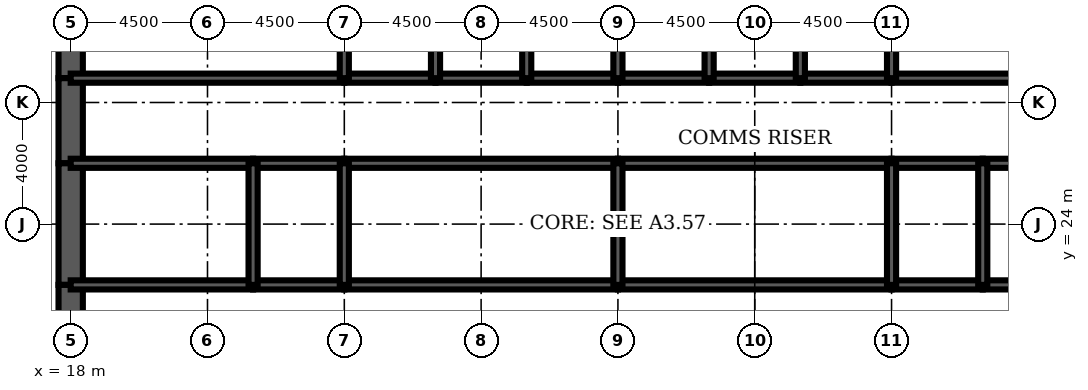
"""IFC4 building model, lengths in metres.
Left out: names, types, materials, properties, quantities, classifications, styles, units other than length and angle.
Written with IfcOpenShell. Run it as: python <this file> out.ifc"""

import sys

from ifc_helpers import new_model, si_unit, direction, frame, frame_2d, origin, place, context, subcontext, project, spatial, rectangle, extrude, element, fill, save


model = new_model("IFC4")
c1 = context("Model", 3, precision=1e-05, world=origin(), true_north=direction((0.0, 1.0)))
c2 = subcontext(c1, "Body", "Model", "MODEL_VIEW")
j1 = project(units=[si_unit("LENGTHUNIT", "METRE"), si_unit("PLANEANGLEUNIT", "RADIAN")], contexts=[c1])
p1 = place(None, origin())
s1 = spatial("IfcSite", under=j1, at=p1, CompositionType="ELEMENT")
p2 = place(p1, origin())
s2 = spatial("IfcBuilding", under=s1, at=p2, CompositionType="ELEMENT")
p3 = place(p2, frame((0.0, 0.0, 244.6)))
s3 = spatial("IfcBuildingStorey", under=s2, at=p3, CompositionType="ELEMENT", Elevation=244.6)
p4 = place(p3, frame((18.0, 32.0, 0.0), z_axis=(0.0, 0.0, 1.0), x_axis=(0.0, -1.0, 0.0)))
e1 = element("IfcWall", 1, at=p4, inside=s3, PredefinedType="SHEAR", context=c2, shape_type="SweptSolid", body=[
    extrude(rectangle(XDim=3.2, YDim=0.8, at=frame_2d((1.6, 0.0))), origin(), (0.0, 0.0, 1.0), 4.2),
])
p5 = place(p3, frame((18.0, 28.8, 0.0), z_axis=(0.0, 0.0, 1.0), x_axis=(0.0, -1.0, 0.0)))
e2 = element("IfcWall", 2, at=p5, inside=s3, PredefinedType="SHEAR", context=c2, shape_type="SweptSolid", body=[
    extrude(rectangle(XDim=2.8, YDim=0.8, at=frame_2d((1.4, 0.0))), origin(), (0.0, 0.0, 1.0), 4.2),
])
p6 = place(p5, frame((0.4, 0.0, 0.0)))
e3 = element("IfcOpeningElement", 3, at=p6, cuts=e2, PredefinedType="OPENING", context=c2, shape_type="SweptSolid", body=[
    extrude(rectangle(XDim=1.8, YDim=2.1, at=frame_2d((0.9, 1.05))), frame((0.0, 0.41, 0.0), z_axis=(0.0, -1.0, 0.0), x_axis=(1.0, 0.0, 0.0)), (0.0, 0.0, 1.0), 0.82),
])
p7 = place(p3, frame((18.0, 26.0, 0.0), z_axis=(0.0, 0.0, 1.0), x_axis=(0.0, -1.0, 0.0)))
e4 = element("IfcWall", 4, at=p7, inside=s3, PredefinedType="SHEAR", context=c2, shape_type="SweptSolid", body=[
    extrude(rectangle(XDim=4.0, YDim=0.8, at=frame_2d((2.0, 0.0))), origin(), (0.0, 0.0, 1.0), 4.2),
])
p8 = place(p3, frame((18.0, 22.0, 0.0), z_axis=(0.0, 0.0, 1.0), x_axis=(0.0, -1.0, 0.0)))
e5 = element("IfcWall", 5, at=p8, inside=s3, PredefinedType="SHEAR", context=c2, shape_type="SweptSolid", body=[
    extrude(rectangle(XDim=2.8, YDim=0.8, at=frame_2d((1.4, 0.0))), origin(), (0.0, 0.0, 1.0), 4.2),
])
p9 = place(p8, frame((0.6, 0.0, 0.0)))
e6 = element("IfcOpeningElement", 6, at=p9, cuts=e5, PredefinedType="OPENING", context=c2, shape_type="SweptSolid", body=[
    extrude(rectangle(XDim=1.8, YDim=2.1, at=frame_2d((0.9, 1.05))), frame((0.0, 0.41, 0.0), z_axis=(0.0, -1.0, 0.0), x_axis=(1.0, 0.0, 0.0)), (0.0, 0.0, 1.0), 0.82),
])
p10 = place(p3, frame((18.0, 28.8, 0.0), z_axis=(0.0, 0.0, 1.0), x_axis=(1.0, 0.0, 0.0)))
e7 = element("IfcWall", 7, at=p10, inside=s3, PredefinedType="SOLIDWALL", context=c2, shape_type="SweptSolid", body=[
    extrude(rectangle(XDim=9.0, YDim=0.3, at=frame_2d((4.5, 0.0))), origin(), (0.0, 0.0, 1.0), 4.2),
])
p11 = place(p10, frame((0.65, 0.0, 0.0)))
e8 = element("IfcOpeningElement", 8, at=p11, cuts=e7, PredefinedType="OPENING", context=c2, shape_type="SweptSolid", body=[
    extrude(rectangle(XDim=1.0, YDim=2.1, at=frame_2d((0.5, 1.05))), frame((0.0, 0.16, 0.0), z_axis=(0.0, -1.0, 0.0), x_axis=(1.0, 0.0, 0.0)), (0.0, 0.0, 1.0), 0.32),
])
p12 = place(p3, frame((27.0, 28.8, 0.0), z_axis=(0.0, 0.0, 1.0), x_axis=(1.0, 0.0, 0.0)))
e9 = element("IfcWall", 9, at=p12, inside=s3, PredefinedType="SOLIDWALL", context=c2, shape_type="SweptSolid", body=[
    extrude(rectangle(XDim=3.0, YDim=0.3, at=frame_2d((1.5, 0.0))), origin(), (0.0, 0.0, 1.0), 4.2),
])
p13 = place(p12, frame((0.95, 0.0, 0.0)))
e10 = element("IfcOpeningElement", 10, at=p13, cuts=e9, PredefinedType="OPENING", context=c2, shape_type="SweptSolid", body=[
    extrude(rectangle(XDim=1.1, YDim=2.2, at=frame_2d((0.55, 1.1))), frame((0.0, 0.16, 0.0), z_axis=(0.0, -1.0, 0.0), x_axis=(1.0, 0.0, 0.0)), (0.0, 0.0, 1.0), 0.32),
])
p14 = place(p3, frame((30.0, 28.8, 0.0), z_axis=(0.0, 0.0, 1.0), x_axis=(1.0, 0.0, 0.0)))
e11 = element("IfcWall", 11, at=p14, inside=s3, PredefinedType="SOLIDWALL", context=c2, shape_type="SweptSolid", body=[
    extrude(rectangle(XDim=3.0, YDim=0.3, at=frame_2d((1.5, 0.0))), origin(), (0.0, 0.0, 1.0), 4.2),
])
p15 = place(p14, frame((0.95, 0.0, 0.0)))
e12 = element("IfcOpeningElement", 12, at=p15, cuts=e11, PredefinedType="OPENING", context=c2, shape_type="SweptSolid", body=[
    extrude(rectangle(XDim=1.1, YDim=2.2, at=frame_2d((0.55, 1.1))), frame((0.0, 0.16, 0.0), z_axis=(0.0, -1.0, 0.0), x_axis=(1.0, 0.0, 0.0)), (0.0, 0.0, 1.0), 0.32),
])
p16 = place(p3, frame((33.0, 28.8, 0.0), z_axis=(0.0, 0.0, 1.0), x_axis=(1.0, 0.0, 0.0)))
e13 = element("IfcWall", 13, at=p16, inside=s3, PredefinedType="SOLIDWALL", context=c2, shape_type="SweptSolid", body=[
    extrude(rectangle(XDim=3.0, YDim=0.3, at=frame_2d((1.5, 0.0))), origin(), (0.0, 0.0, 1.0), 4.2),
])
p17 = place(p16, frame((0.95, 0.0, 0.0)))
e14 = element("IfcOpeningElement", 14, at=p17, cuts=e13, PredefinedType="OPENING", context=c2, shape_type="SweptSolid", body=[
    extrude(rectangle(XDim=1.1, YDim=2.2, at=frame_2d((0.55, 1.1))), frame((0.0, 0.16, 0.0), z_axis=(0.0, -1.0, 0.0), x_axis=(1.0, 0.0, 0.0)), (0.0, 0.0, 1.0), 0.32),
])
for number, where, z_axis, x_axis in (
    (15, (36.0, 28.8, 0.0), (0.0, 0.0, 1.0), (1.0, 0.0, 0.0)),
    (16, (39.0, 28.8, 0.0), (0.0, 0.0, 1.0), (1.0, 0.0, 0.0)),
):
    element("IfcWall", number, at=place(p3, frame(where, z_axis=z_axis, x_axis=x_axis)), inside=s3, PredefinedType="SOLIDWALL", context=c2, shape_type="SweptSolid", body=[
        extrude(rectangle(XDim=3.0, YDim=0.3, at=frame_2d((1.5, 0.0))), origin(), (0.0, 0.0, 1.0), 4.2),
    ])
p18 = place(p3, frame((42.0, 28.8, 0.0), z_axis=(0.0, 0.0, 1.0), x_axis=(1.0, 0.0, 0.0)))
e17 = element("IfcWall", 17, at=p18, inside=s3, PredefinedType="SOLIDWALL", context=c2, shape_type="SweptSolid", body=[
    extrude(rectangle(XDim=3.0, YDim=0.3, at=frame_2d((1.5, 0.0))), origin(), (0.0, 0.0, 1.0), 4.2),
])
p19 = place(p18, frame((0.95, 0.0, 0.0)))
e18 = element("IfcOpeningElement", 18, at=p19, cuts=e17, PredefinedType="OPENING", context=c2, shape_type="SweptSolid", body=[
    extrude(rectangle(XDim=1.1, YDim=2.2, at=frame_2d((0.55, 1.1))), frame((0.0, 0.16, 0.0), z_axis=(0.0, -1.0, 0.0), x_axis=(1.0, 0.0, 0.0)), (0.0, 0.0, 1.0), 0.32),
])
p20 = place(p3, frame((45.0, 28.8, 0.0), z_axis=(0.0, 0.0, 1.0), x_axis=(1.0, 0.0, 0.0)))
e19 = element("IfcWall", 19, at=p20, inside=s3, PredefinedType="SOLIDWALL", context=c2, shape_type="SweptSolid", body=[
    extrude(rectangle(XDim=9.0, YDim=0.3, at=frame_2d((4.5, 0.0))), origin(), (0.0, 0.0, 1.0), 4.2),
])
p21 = place(p20, frame((7.35, 0.0, 0.0)))
e20 = element("IfcOpeningElement", 20, at=p21, cuts=e19, PredefinedType="OPENING", context=c2, shape_type="SweptSolid", body=[
    extrude(rectangle(XDim=1.0, YDim=2.1, at=frame_2d((0.5, 1.05))), frame((0.0, 0.16, 0.0), z_axis=(0.0, -1.0, 0.0), x_axis=(1.0, 0.0, 0.0)), (0.0, 0.0, 1.0), 0.32),
])
p22 = place(p3, frame((18.0, 22.0, 0.0), z_axis=(0.0, 0.0, 1.0), x_axis=(1.0, 0.0, 0.0)))
e21 = element("IfcWall", 21, at=p22, inside=s3, PredefinedType="SOLIDWALL", context=c2, shape_type="SweptSolid", body=[
    extrude(rectangle(XDim=6.0, YDim=0.3, at=frame_2d((3.0, 0.0))), origin(), (0.0, 0.0, 1.0), 4.2),
])
p23 = place(p22, frame((4.4, 0.0, 0.0)))
e22 = element("IfcOpeningElement", 22, at=p23, cuts=e21, PredefinedType="OPENING", context=c2, shape_type="SweptSolid", body=[
    extrude(rectangle(XDim=1.0, YDim=2.1, at=frame_2d((0.5, 1.05))), frame((0.0, 0.16, 0.0), z_axis=(0.0, -1.0, 0.0), x_axis=(1.0, 0.0, 0.0)), (0.0, 0.0, 1.0), 0.32),
])
p24 = place(p22, frame((0.8, 0.0, 0.0)))
e23 = element("IfcOpeningElement", 23, at=p24, cuts=e21, PredefinedType="OPENING", context=c2, shape_type="SweptSolid", body=[
    extrude(rectangle(XDim=1.0, YDim=2.1, at=frame_2d((0.5, 1.05))), frame((0.0, 0.16, 0.0), z_axis=(0.0, -1.0, 0.0), x_axis=(1.0, 0.0, 0.0)), (0.0, 0.0, 1.0), 0.32),
])
p25 = place(p3, frame((24.0, 22.0, 0.0), z_axis=(0.0, 0.0, 1.0), x_axis=(1.0, 0.0, 0.0)))
e24 = element("IfcWall", 24, at=p25, inside=s3, PredefinedType="SOLIDWALL", context=c2, shape_type="SweptSolid", body=[
    extrude(rectangle(XDim=3.0, YDim=0.3, at=frame_2d((1.5, 0.0))), origin(), (0.0, 0.0, 1.0), 4.2),
])
p26 = place(p25, frame((1.0, 0.0, 0.0)))
e25 = element("IfcOpeningElement", 25, at=p26, cuts=e24, PredefinedType="OPENING", context=c2, shape_type="SweptSolid", body=[
    extrude(rectangle(XDim=1.0, YDim=2.1, at=frame_2d((0.5, 1.05))), frame((0.0, 0.16, 0.0), z_axis=(0.0, -1.0, 0.0), x_axis=(1.0, 0.0, 0.0)), (0.0, 0.0, 1.0), 0.32),
])
p27 = place(p3, frame((27.0, 22.0, 0.0), z_axis=(0.0, 0.0, 1.0), x_axis=(1.0, 0.0, 0.0)))
e26 = element("IfcWall", 26, at=p27, inside=s3, PredefinedType="SOLIDWALL", context=c2, shape_type="SweptSolid", body=[
    extrude(rectangle(XDim=9.0, YDim=0.3, at=frame_2d((4.5, 0.0))), origin(), (0.0, 0.0, 1.0), 4.2),
])
p28 = place(p27, frame((4.0, 0.0, 0.0)))
e27 = element("IfcOpeningElement", 27, at=p28, cuts=e26, PredefinedType="OPENING", context=c2, shape_type="SweptSolid", body=[
    extrude(rectangle(XDim=1.0, YDim=2.1, at=frame_2d((0.5, 1.05))), frame((0.0, 0.16, 0.0), z_axis=(0.0, -1.0, 0.0), x_axis=(1.0, 0.0, 0.0)), (0.0, 0.0, 1.0), 0.32),
])
p29 = place(p3, frame((36.0, 22.0, 0.0), z_axis=(0.0, 0.0, 1.0), x_axis=(1.0, 0.0, 0.0)))
e28 = element("IfcWall", 28, at=p29, inside=s3, PredefinedType="SOLIDWALL", context=c2, shape_type="SweptSolid", body=[
    extrude(rectangle(XDim=9.0, YDim=0.3, at=frame_2d((4.5, 0.0))), origin(), (0.0, 0.0, 1.0), 4.2),
])
p30 = place(p29, frame((4.0, 0.0, 0.0)))
e29 = element("IfcOpeningElement", 29, at=p30, cuts=e28, PredefinedType="OPENING", context=c2, shape_type="SweptSolid", body=[
    extrude(rectangle(XDim=1.0, YDim=2.1, at=frame_2d((0.5, 1.05))), frame((0.0, 0.16, 0.0), z_axis=(0.0, -1.0, 0.0), x_axis=(1.0, 0.0, 0.0)), (0.0, 0.0, 1.0), 0.32),
])
p31 = place(p3, frame((45.0, 22.0, 0.0), z_axis=(0.0, 0.0, 1.0), x_axis=(1.0, 0.0, 0.0)))
e30 = element("IfcWall", 30, at=p31, inside=s3, PredefinedType="SOLIDWALL", context=c2, shape_type="SweptSolid", body=[
    extrude(rectangle(XDim=3.0, YDim=0.3, at=frame_2d((1.5, 0.0))), origin(), (0.0, 0.0, 1.0), 4.2),
])
p32 = place(p31, frame((1.0, 0.0, 0.0)))
e31 = element("IfcOpeningElement", 31, at=p32, cuts=e30, PredefinedType="OPENING", context=c2, shape_type="SweptSolid", body=[
    extrude(rectangle(XDim=1.0, YDim=2.1, at=frame_2d((0.5, 1.05))), frame((0.0, 0.16, 0.0), z_axis=(0.0, -1.0, 0.0), x_axis=(1.0, 0.0, 0.0)), (0.0, 0.0, 1.0), 0.32),
])
p33 = place(p3, frame((48.0, 22.0, 0.0), z_axis=(0.0, 0.0, 1.0), x_axis=(1.0, 0.0, 0.0)))
e32 = element("IfcWall", 32, at=p33, inside=s3, PredefinedType="SOLIDWALL", context=c2, shape_type="SweptSolid", body=[
    extrude(rectangle(XDim=6.0, YDim=0.3, at=frame_2d((3.0, 0.0))), origin(), (0.0, 0.0, 1.0), 4.2),
])
p34 = place(p33, frame((2.0, 0.0, 0.0)))
e33 = element("IfcOpeningElement", 33, at=p34, cuts=e32, PredefinedType="OPENING", context=c2, shape_type="SweptSolid", body=[
    extrude(rectangle(XDim=1.0, YDim=2.1, at=frame_2d((0.5, 1.05))), frame((0.0, 0.16, 0.0), z_axis=(0.0, -1.0, 0.0), x_axis=(1.0, 0.0, 0.0)), (0.0, 0.0, 1.0), 0.32),
])
p35 = place(p33, frame((4.35, 0.0, 0.0)))
e34 = element("IfcOpeningElement", 34, at=p35, cuts=e32, PredefinedType="OPENING", context=c2, shape_type="SweptSolid", body=[
    extrude(rectangle(XDim=1.0, YDim=2.1, at=frame_2d((0.5, 1.05))), frame((0.0, 0.16, 0.0), z_axis=(0.0, -1.0, 0.0), x_axis=(1.0, 0.0, 0.0)), (0.0, 0.0, 1.0), 0.32),
])
p36 = place(p3, frame((18.0, 26.0, 0.0), z_axis=(0.0, 0.0, 1.0), x_axis=(1.0, 0.0, 0.0)))
e35 = element("IfcWall", 35, at=p36, inside=s3, PredefinedType="SOLIDWALL", context=c2, shape_type="SweptSolid", body=[
    extrude(rectangle(XDim=6.0, YDim=0.3, at=frame_2d((3.0, 0.0))), origin(), (0.0, 0.0, 1.0), 4.2),
])
p37 = place(p3, frame((24.0, 26.0, 0.0), z_axis=(0.0, 0.0, 1.0), x_axis=(1.0, 0.0, 0.0)))
e36 = element("IfcWall", 36, at=p37, inside=s3, PredefinedType="SOLIDWALL", context=c2, shape_type="SweptSolid", body=[
    extrude(rectangle(XDim=3.0, YDim=0.3, at=frame_2d((1.5, 0.0))), origin(), (0.0, 0.0, 1.0), 4.2),
])
for number, where, z_axis, x_axis in (
    (37, (27.0, 26.0, 0.0), (0.0, 0.0, 1.0), (1.0, 0.0, 0.0)),
    (38, (36.0, 26.0, 0.0), (0.0, 0.0, 1.0), (1.0, 0.0, 0.0)),
):
    element("IfcWall", number, at=place(p3, frame(where, z_axis=z_axis, x_axis=x_axis)), inside=s3, PredefinedType="SOLIDWALL", context=c2, shape_type="SweptSolid", body=[
        extrude(rectangle(XDim=9.0, YDim=0.3, at=frame_2d((4.5, 0.0))), origin(), (0.0, 0.0, 1.0), 4.2),
    ])
p38 = place(p3, frame((45.0, 26.0, 0.0), z_axis=(0.0, 0.0, 1.0), x_axis=(1.0, 0.0, 0.0)))
e39 = element("IfcWall", 39, at=p38, inside=s3, PredefinedType="SOLIDWALL", context=c2, shape_type="SweptSolid", body=[
    extrude(rectangle(XDim=3.0, YDim=0.3, at=frame_2d((1.5, 0.0))), origin(), (0.0, 0.0, 1.0), 4.2),
])
p39 = place(p3, frame((48.0, 26.0, 0.0), z_axis=(0.0, 0.0, 1.0), x_axis=(1.0, 0.0, 0.0)))
e40 = element("IfcWall", 40, at=p39, inside=s3, PredefinedType="SOLIDWALL", context=c2, shape_type="SweptSolid", body=[
    extrude(rectangle(XDim=6.0, YDim=0.3, at=frame_2d((3.0, 0.0))), origin(), (0.0, 0.0, 1.0), 4.2),
])
for number, where, z_axis, x_axis in (
    (41, (27.0, 28.8, 0.0), (0.0, 0.0, 1.0), (0.0, 1.0, 0.0)),
    (42, (30.0, 28.8, 0.0), (0.0, 0.0, 1.0), (0.0, 1.0, 0.0)),
    (43, (33.0, 28.8, 0.0), (0.0, 0.0, 1.0), (0.0, 1.0, 0.0)),
    (44, (36.0, 28.8, 0.0), (0.0, 0.0, 1.0), (0.0, 1.0, 0.0)),
    (45, (39.0, 28.8, 0.0), (0.0, 0.0, 1.0), (0.0, 1.0, 0.0)),
    (46, (42.0, 28.8, 0.0), (0.0, 0.0, 1.0), (0.0, 1.0, 0.0)),
    (47, (45.0, 28.8, 0.0), (0.0, 0.0, 1.0), (0.0, 1.0, 0.0)),
):
    element("IfcWall", number, at=place(p3, frame(where, z_axis=z_axis, x_axis=x_axis)), inside=s3, PredefinedType="SOLIDWALL", context=c2, shape_type="SweptSolid", body=[
        extrude(rectangle(XDim=3.2, YDim=0.3, at=frame_2d((1.6, 0.0))), origin(), (0.0, 0.0, 1.0), 4.2),
    ])
for number, where, z_axis, x_axis in (
    (48, (24.0, 22.0, 0.0), (0.0, 0.0, 1.0), (0.0, 1.0, 0.0)),
    (49, (27.0, 22.0, 0.0), (0.0, 0.0, 1.0), (0.0, 1.0, 0.0)),
    (50, (36.0, 22.0, 0.0), (0.0, 0.0, 1.0), (0.0, 1.0, 0.0)),
    (51, (45.0, 22.0, 0.0), (0.0, 0.0, 1.0), (0.0, 1.0, 0.0)),
    (52, (48.0, 22.0, 0.0), (0.0, 0.0, 1.0), (0.0, 1.0, 0.0)),
):
    element("IfcWall", number, at=place(p3, frame(where, z_axis=z_axis, x_axis=x_axis)), inside=s3, PredefinedType="SOLIDWALL", context=c2, shape_type="SweptSolid", body=[
        extrude(rectangle(XDim=4.0, YDim=0.3, at=frame_2d((2.0, 0.0))), origin(), (0.0, 0.0, 1.0), 4.2),
    ])
p40 = place(p3, frame((38.5, 22.15, 0.0), z_axis=(0.0, 0.0, 1.0), x_axis=(0.0, 1.0, 0.0)))
e53 = element("IfcWall", 53, at=p40, inside=s3, PredefinedType="PARTITIONING", context=c2, shape_type="SweptSolid", body=[
    extrude(rectangle(XDim=3.7, YDim=0.15, at=frame_2d((1.85, 0.0))), origin(), (0.0, 0.0, 1.0), 3.0),
])
p41 = place(p40, frame((2.2, 0.0, 0.0)))
e54 = element("IfcOpeningElement", 54, at=p41, cuts=e53, PredefinedType="OPENING", context=c2, shape_type="SweptSolid", body=[
    extrude(rectangle(XDim=1.0, YDim=2.1, at=frame_2d((0.5, 1.05))), frame((0.0, 0.085, 0.0), z_axis=(0.0, -1.0, 0.0), x_axis=(1.0, 0.0, 0.0)), (0.0, 0.0, 1.0), 0.17),
])
p42 = place(p3, frame((20.275, 22.15, 0.0), z_axis=(0.0, 0.0, 1.0), x_axis=(0.0, 1.0, 0.0)))
e55 = element("IfcWall", 55, at=p42, inside=s3, PredefinedType="PARTITIONING", context=c2, shape_type="SweptSolid", body=[
    extrude(rectangle(XDim=3.7, YDim=0.15, at=frame_2d((1.85, 0.0))), origin(), (0.0, 0.0, 1.0), 3.0),
])
p43 = place(p3, frame((25.2, 26.15, 0.0), z_axis=(0.0, 0.0, 1.0), x_axis=(0.0, 1.0, 0.0)))
e56 = element("IfcWall", 56, at=p43, inside=s3, PredefinedType="PARTITIONING", context=c2, shape_type="SweptSolid", body=[
    extrude(rectangle(XDim=2.5, YDim=0.15, at=frame_2d((1.25, 0.0))), origin(), (0.0, 0.0, 1.0), 3.0),
])
p44 = place(p43, frame((0.35, 0.0, 0.0)))
e57 = element("IfcOpeningElement", 57, at=p44, cuts=e56, PredefinedType="OPENING", context=c2, shape_type="SweptSolid", body=[
    extrude(rectangle(XDim=1.0, YDim=2.1, at=frame_2d((0.5, 1.05))), frame((0.0, 0.085, 0.0), z_axis=(0.0, -1.0, 0.0), x_axis=(1.0, 0.0, 0.0)), (0.0, 0.0, 1.0), 0.17),
])
p45 = place(p41, origin())
e58 = element("IfcDoor", 58, at=p45, inside=s3, OperationType="SINGLE_SWING_RIGHT", PredefinedType="DOOR", context=c2, shape_type="SweptSolid", body=[
    extrude(rectangle(XDim=1.0, YDim=2.1, at=frame_2d((0.5, 1.05))), frame((0.0, 0.025, 0.0), z_axis=(0.0, -1.0, 0.0), x_axis=(1.0, 0.0, 0.0)), (0.0, 0.0, 1.0), 0.05),
])
fill(e54, e58)
p46 = place(p44, origin())
e59 = element("IfcDoor", 59, at=p46, inside=s3, OperationType="SINGLE_SWING_LEFT", PredefinedType="DOOR", context=c2, shape_type="SweptSolid", body=[
    extrude(rectangle(XDim=1.0, YDim=2.1, at=frame_2d((0.5, 1.05))), frame((0.0, 0.025, 0.0), z_axis=(0.0, -1.0, 0.0), x_axis=(1.0, 0.0, 0.0)), (0.0, 0.0, 1.0), 0.05),
])
fill(e57, e59)
p47 = place(p19, origin())
e60 = element("IfcDoor", 60, at=p47, inside=s3, OperationType="DOUBLE_DOOR_SLIDING", PredefinedType="USERDEFINED", context=c2, shape_type="SweptSolid", body=[
    extrude(rectangle(XDim=1.1, YDim=2.2, at=frame_2d((0.55, 1.1))), frame((0.0, 0.025, 0.0), z_axis=(0.0, -1.0, 0.0), x_axis=(1.0, 0.0, 0.0)), (0.0, 0.0, 1.0), 0.05),
])
fill(e18, e60)
p48 = place(p13, origin())
e61 = element("IfcDoor", 61, at=p48, inside=s3, OperationType="DOUBLE_DOOR_SLIDING", PredefinedType="USERDEFINED", context=c2, shape_type="SweptSolid", body=[
    extrude(rectangle(XDim=1.1, YDim=2.2, at=frame_2d((0.55, 1.1))), frame((0.0, 0.025, 0.0), z_axis=(0.0, -1.0, 0.0), x_axis=(1.0, 0.0, 0.0)), (0.0, 0.0, 1.0), 0.05),
])
fill(e10, e61)
p49 = place(p15, origin())
e62 = element("IfcDoor", 62, at=p49, inside=s3, OperationType="DOUBLE_DOOR_SLIDING", PredefinedType="USERDEFINED", context=c2, shape_type="SweptSolid", body=[
    extrude(rectangle(XDim=1.1, YDim=2.2, at=frame_2d((0.55, 1.1))), frame((0.0, 0.025, 0.0), z_axis=(0.0, -1.0, 0.0), x_axis=(1.0, 0.0, 0.0)), (0.0, 0.0, 1.0), 0.05),
])
fill(e12, e62)
p50 = place(p17, origin())
e63 = element("IfcDoor", 63, at=p50, inside=s3, OperationType="DOUBLE_DOOR_SLIDING", PredefinedType="USERDEFINED", context=c2, shape_type="SweptSolid", body=[
    extrude(rectangle(XDim=1.1, YDim=2.2, at=frame_2d((0.55, 1.1))), frame((0.0, 0.025, 0.0), z_axis=(0.0, -1.0, 0.0), x_axis=(1.0, 0.0, 0.0)), (0.0, 0.0, 1.0), 0.05),
])
fill(e14, e63)
p51 = place(p11, origin())
e64 = element("IfcDoor", 64, at=p51, inside=s3, OperationType="SINGLE_SWING_LEFT", PredefinedType="DOOR", context=c2, shape_type="SweptSolid", body=[
    extrude(rectangle(XDim=1.0, YDim=2.1, at=frame_2d((0.5, 1.05))), frame((0.0, 0.025, 0.0), z_axis=(0.0, -1.0, 0.0), x_axis=(1.0, 0.0, 0.0)), (0.0, 0.0, 1.0), 0.05),
])
fill(e8, e64)
p52 = place(p9, origin())
e65 = element("IfcDoor", 65, at=p52, inside=s3, OperationType="SINGLE_SWING_LEFT", PredefinedType="DOOR", context=c2, shape_type="SweptSolid", body=[
    extrude(rectangle(XDim=1.8, YDim=2.1, at=frame_2d((0.9, 1.05))), frame((0.0, 0.4, 0.0), z_axis=(0.0, -1.0, 0.0), x_axis=(1.0, 0.0, 0.0)), (0.0, 0.0, 1.0), 0.8),
])
fill(e6, e65)
p53 = place(p6, origin())
e66 = element("IfcDoor", 66, at=p53, inside=s3, OperationType="SINGLE_SWING_LEFT", PredefinedType="DOOR", context=c2, shape_type="SweptSolid", body=[
    extrude(rectangle(XDim=1.8, YDim=2.1, at=frame_2d((0.9, 1.05))), frame((0.0, 0.4, 0.0), z_axis=(0.0, -1.0, 0.0), x_axis=(1.0, 0.0, 0.0)), (0.0, 0.0, 1.0), 0.8),
])
fill(e3, e66)
p54 = place(p23, origin())
e67 = element("IfcDoor", 67, at=p54, inside=s3, OperationType="SINGLE_SWING_RIGHT", PredefinedType="DOOR", context=c2, shape_type="SweptSolid", body=[
    extrude(rectangle(XDim=1.0, YDim=2.1, at=frame_2d((0.5, 1.05))), frame((0.0, 0.025, 0.0), z_axis=(0.0, -1.0, 0.0), x_axis=(1.0, 0.0, 0.0)), (0.0, 0.0, 1.0), 0.05),
])
fill(e22, e67)
p55 = place(p26, origin())
e68 = element("IfcDoor", 68, at=p55, inside=s3, OperationType="SINGLE_SWING_LEFT", PredefinedType="DOOR", context=c2, shape_type="SweptSolid", body=[
    extrude(rectangle(XDim=1.0, YDim=2.1, at=frame_2d((0.5, 1.05))), frame((0.0, 0.025, 0.0), z_axis=(0.0, -1.0, 0.0), x_axis=(1.0, 0.0, 0.0)), (0.0, 0.0, 1.0), 0.05),
])
fill(e25, e68)
p56 = place(p28, origin())
e69 = element("IfcDoor", 69, at=p56, inside=s3, OperationType="SINGLE_SWING_LEFT", PredefinedType="DOOR", context=c2, shape_type="SweptSolid", body=[
    extrude(rectangle(XDim=1.0, YDim=2.1, at=frame_2d((0.5, 1.05))), frame((0.0, 0.025, 0.0), z_axis=(0.0, -1.0, 0.0), x_axis=(1.0, 0.0, 0.0)), (0.0, 0.0, 1.0), 0.05),
])
fill(e27, e69)
p57 = place(p30, origin())
e70 = element("IfcDoor", 70, at=p57, inside=s3, OperationType="SINGLE_SWING_LEFT", PredefinedType="DOOR", context=c2, shape_type="SweptSolid", body=[
    extrude(rectangle(XDim=1.0, YDim=2.1, at=frame_2d((0.5, 1.05))), frame((0.0, 0.025, 0.0), z_axis=(0.0, -1.0, 0.0), x_axis=(1.0, 0.0, 0.0)), (0.0, 0.0, 1.0), 0.05),
])
fill(e29, e70)
p58 = place(p32, origin())
e71 = element("IfcDoor", 71, at=p58, inside=s3, OperationType="SINGLE_SWING_LEFT", PredefinedType="DOOR", context=c2, shape_type="SweptSolid", body=[
    extrude(rectangle(XDim=1.0, YDim=2.1, at=frame_2d((0.5, 1.05))), frame((0.0, 0.025, 0.0), z_axis=(0.0, -1.0, 0.0), x_axis=(1.0, 0.0, 0.0)), (0.0, 0.0, 1.0), 0.05),
])
fill(e31, e71)
p59 = place(p24, origin())
e72 = element("IfcDoor", 72, at=p59, inside=s3, OperationType="SINGLE_SWING_LEFT", PredefinedType="DOOR", context=c2, shape_type="SweptSolid", body=[
    extrude(rectangle(XDim=1.0, YDim=2.1, at=frame_2d((0.5, 1.05))), frame((0.0, 0.025, 0.0), z_axis=(0.0, -1.0, 0.0), x_axis=(1.0, 0.0, 0.0)), (0.0, 0.0, 1.0), 0.05),
])
fill(e23, e72)
save(model, sys.argv[1])
